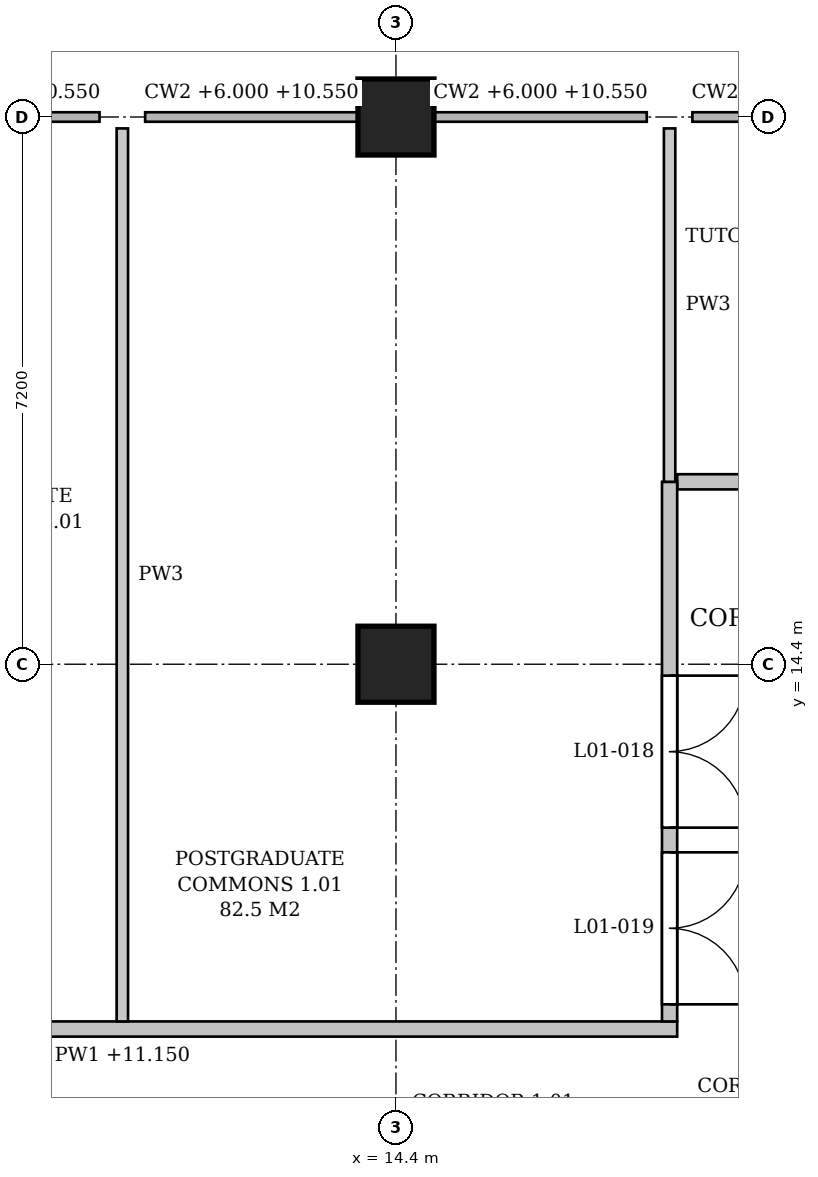
"""IFC4 building model, lengths in metres.
Left out: names, types, materials, properties, quantities, classifications, styles, units other than length and angle.
Written with IfcOpenShell. Run it as: python <this file> out.ifc"""

import sys

from ifc_helpers import new_model, si_unit, direction, frame, frame_2d, origin, origin_2d, place, context, subcontext, project, spatial, polyline, rectangle, outline, extrude, element, fill, save


model = new_model("IFC4")
c1 = context("Model", 3, precision=1e-05, world=origin(), true_north=direction((0.0, 1.0)))
c2 = subcontext(c1, "Body", "Model", "MODEL_VIEW")
j1 = project(units=[si_unit("LENGTHUNIT", "METRE"), si_unit("PLANEANGLEUNIT", "RADIAN")], contexts=[c1])
p1 = place(None, origin())
s1 = spatial("IfcSite", under=j1, at=p1, CompositionType="ELEMENT")
p2 = place(p1, origin())
s2 = spatial("IfcBuilding", under=s1, at=p2, CompositionType="ELEMENT")
p3 = place(p2, frame((0.0, 0.0, 6.0)))
s3 = spatial("IfcBuildingStorey", under=s2, at=p3, CompositionType="ELEMENT", Elevation=6.0)
for number, where, z_axis, x_axis in (
    (1, (14.4, 14.4, 0.0), (0.0, 0.0, 1.0), (1.0, 0.0, 0.0)),
    (2, (14.4, 21.6, 0.0), (0.0, 0.0, 1.0), (1.0, 0.0, 0.0)),
):
    element("IfcColumn", number, at=place(p3, frame(where, z_axis=z_axis, x_axis=x_axis)), inside=s3, PredefinedType="COLUMN", context=c2, shape_type="SweptSolid", body=[
        extrude(rectangle(XDim=1.0, YDim=1.0, at=origin_2d()), origin(), (0.0, 0.0, 1.0), 5.4),
    ])
p4 = place(p3, frame((3.5, 9.6, 0.0), z_axis=(0.0, 0.0, 1.0), x_axis=(1.0, 0.0, 0.0)))
e3 = element("IfcWall", 3, at=p4, inside=s3, PredefinedType="PARTITIONING", context=c2, shape_type="SweptSolid", body=[
    extrude(outline(polyline([(0.0, 0.0), (14.6, 0.0), (14.6, 5.15), (11.15, 5.15), (11.15, 4.4), (10.65, 4.4), (10.65, 5.15), (3.95, 5.15), (3.95, 4.4), (3.45, 4.4), (3.45, 5.15), (0.0, 5.15), (0.0, 0.0)])), frame((0.0, 0.1, 0.0), z_axis=(0.0, -1.0, 0.0), x_axis=(1.0, 0.0, 0.0)), (0.0, 0.0, 1.0), 0.2),
])
p5 = place(p4, frame((1.4, 0.0, 0.0)))
e4 = element("IfcOpeningElement", 4, at=p5, cuts=e3, PredefinedType="OPENING", context=c2, shape_type="SweptSolid", body=[
    extrude(rectangle(XDim=1.0, YDim=2.1, at=frame_2d((0.5, 1.05))), frame((0.0, 0.11, 0.0), z_axis=(0.0, -1.0, 0.0), x_axis=(1.0, 0.0, 0.0)), (0.0, 0.0, 1.0), 0.22),
])
p6 = place(p4, frame((5.0, 0.0, 0.0)))
e5 = element("IfcOpeningElement", 5, at=p6, cuts=e3, PredefinedType="OPENING", context=c2, shape_type="SweptSolid", body=[
    extrude(rectangle(XDim=1.0, YDim=2.1, at=frame_2d((0.5, 1.05))), frame((0.0, 0.11, 0.0), z_axis=(0.0, -1.0, 0.0), x_axis=(1.0, 0.0, 0.0)), (0.0, 0.0, 1.0), 0.22),
])
p7 = place(p3, frame((18.1, 16.8, 0.0), z_axis=(0.0, 0.0, 1.0), x_axis=(1.0, 0.0, 0.0)))
e6 = element("IfcWall", 6, at=p7, inside=s3, PredefinedType="PARTITIONING", context=c2, shape_type="SweptSolid", body=[
    extrude(outline(polyline([(0.0, 0.0), (3.4, 0.0), (3.4, 4.4), (3.25, 4.4), (3.25, 5.15), (0.0, 5.15), (0.0, 0.0)])), frame((0.0, 0.1, 0.0), z_axis=(0.0, -1.0, 0.0), x_axis=(1.0, 0.0, 0.0)), (0.0, 0.0, 1.0), 0.2),
])
p8 = place(p7, frame((1.2, 0.0, 0.0)))
e7 = element("IfcOpeningElement", 7, at=p8, cuts=e6, PredefinedType="OPENING", context=c2, shape_type="SweptSolid", body=[
    extrude(rectangle(XDim=1.0, YDim=2.1, at=frame_2d((0.5, 1.05))), frame((0.0, 0.11, 0.0), z_axis=(0.0, -1.0, 0.0), x_axis=(1.0, 0.0, 0.0)), (0.0, 0.0, 1.0), 0.22),
])
p9 = place(p3, frame((10.8, 9.7, 0.0), z_axis=(0.0, 0.0, 1.0), x_axis=(0.0, 1.0, 0.0)))
e8 = element("IfcWall", 8, at=p9, inside=s3, PredefinedType="PARTITIONING", context=c2, shape_type="SweptSolid", body=[
    extrude(rectangle(XDim=11.75, YDim=0.15, at=frame_2d((5.875, 0.0))), origin(), (0.0, 0.0, 1.0), 4.4),
])
p10 = place(p3, frame((18.0, 9.7, 0.0), z_axis=(0.0, 0.0, 1.0), x_axis=(0.0, 1.0, 0.0)))
e9 = element("IfcWall", 9, at=p10, inside=s3, PredefinedType="PARTITIONING", context=c2, shape_type="SweptSolid", body=[
    extrude(outline(polyline([(0.0, 0.0), (7.1, 0.0), (7.1, 5.15), (4.95, 5.15), (4.95, 4.4), (4.45, 4.4), (4.45, 5.15), (0.0, 5.15), (0.0, 0.0)])), frame((0.0, 0.1, 0.0), z_axis=(0.0, -1.0, 0.0), x_axis=(1.0, 0.0, 0.0)), (0.0, 0.0, 1.0), 0.2),
])
p11 = place(p10, frame((2.55, 0.0, 0.0)))
e10 = element("IfcOpeningElement", 10, at=p11, cuts=e9, PredefinedType="OPENING", context=c2, shape_type="SweptSolid", body=[
    extrude(rectangle(XDim=2.0, YDim=2.1, at=frame_2d((1.0, 1.05))), frame((0.0, 0.11, 0.0), z_axis=(0.0, -1.0, 0.0), x_axis=(1.0, 0.0, 0.0)), (0.0, 0.0, 1.0), 0.22),
])
p12 = place(p10, frame((0.225, 0.0, 0.0)))
e11 = element("IfcOpeningElement", 11, at=p12, cuts=e9, PredefinedType="OPENING", context=c2, shape_type="SweptSolid", body=[
    extrude(rectangle(XDim=2.0, YDim=2.1, at=frame_2d((1.0, 1.05))), frame((0.0, 0.11, 0.0), z_axis=(0.0, -1.0, 0.0), x_axis=(1.0, 0.0, 0.0)), (0.0, 0.0, 1.0), 0.22),
])
p13 = place(p3, frame((18.0, 16.8, 0.0), z_axis=(0.0, 0.0, 1.0), x_axis=(0.0, 1.0, 0.0)))
e12 = element("IfcWall", 12, at=p13, inside=s3, PredefinedType="PARTITIONING", context=c2, shape_type="SweptSolid", body=[
    extrude(rectangle(XDim=4.65, YDim=0.15, at=frame_2d((2.325, 0.0))), origin(), (0.0, 0.0, 1.0), 4.4),
])
p14 = place(p11, origin())
e13 = element("IfcDoor", 13, at=p14, inside=s3, OperationType="DOUBLE_DOOR_SINGLE_SWING", PredefinedType="DOOR", context=c2, shape_type="SweptSolid", body=[
    extrude(rectangle(XDim=2.0, YDim=2.1, at=frame_2d((1.0, 1.05))), frame((0.0, 0.025, 0.0), z_axis=(0.0, -1.0, 0.0), x_axis=(1.0, 0.0, 0.0)), (0.0, 0.0, 1.0), 0.05),
])
fill(e10, e13)
p15 = place(p12, origin())
e14 = element("IfcDoor", 14, at=p15, inside=s3, OperationType="DOUBLE_DOOR_SINGLE_SWING", PredefinedType="DOOR", context=c2, shape_type="SweptSolid", body=[
    extrude(rectangle(XDim=2.0, YDim=2.1, at=frame_2d((1.0, 1.05))), frame((0.0, 0.025, 0.0), z_axis=(0.0, -1.0, 0.0), x_axis=(1.0, 0.0, 0.0)), (0.0, 0.0, 1.0), 0.05),
])
fill(e11, e14)
save(model, sys.argv[1])
